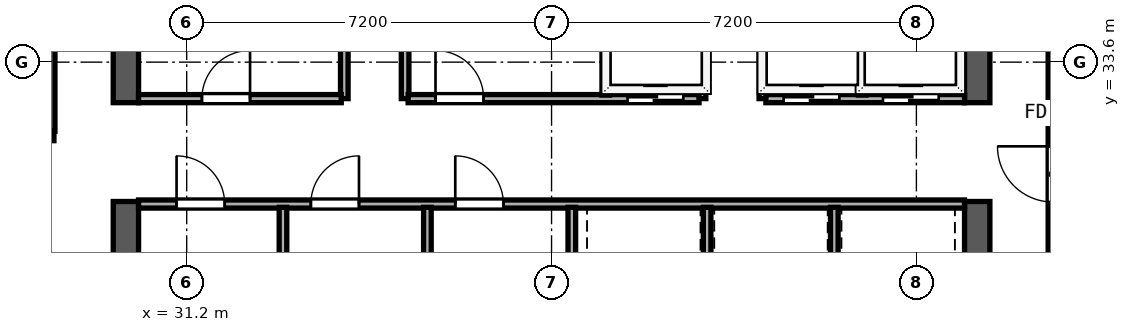
"""IFC4 building model, lengths in metres.
Left out: names, types, materials, properties, quantities, classifications, styles, units other than length and angle.
Written with IfcOpenShell. Run it as: python <this file> out.ifc"""

import sys

from ifc_helpers import new_model, si_unit, direction, frame, frame_2d, origin, place, context, subcontext, project, spatial, rectangle, extrude, element, fill, save


model = new_model("IFC4")
c1 = context("Model", 3, precision=1e-05, world=origin(), true_north=direction((0.0, 1.0)))
c2 = subcontext(c1, "Body", "Model", "MODEL_VIEW")
j1 = project(units=[si_unit("LENGTHUNIT", "METRE"), si_unit("PLANEANGLEUNIT", "RADIAN")], contexts=[c1])
p1 = place(None, origin())
s1 = spatial("IfcSite", under=j1, at=p1, CompositionType="ELEMENT")
p2 = place(p1, origin())
s2 = spatial("IfcBuilding", under=s1, at=p2, CompositionType="ELEMENT")
p3 = place(p2, frame((0.0, 0.0, 277.55)))
s3 = spatial("IfcBuildingStorey", under=s2, at=p3, CompositionType="ELEMENT", Elevation=277.55)
p4 = place(p3, frame((30.0, 26.65, 0.0), z_axis=(0.0, 0.0, 1.0), x_axis=(0.0, 1.0, 0.0)))
e1 = element("IfcWall", 1, at=p4, inside=s3, PredefinedType="SHEAR", context=c2, shape_type="SweptSolid", body=[
    extrude(rectangle(XDim=4.2, YDim=0.5, at=frame_2d((2.1, 0.0))), origin(), (0.0, 0.0, 1.0), 4.4),
])
p5 = place(p3, frame((30.0, 32.8, 0.0), z_axis=(0.0, 0.0, 1.0), x_axis=(0.0, 1.0, 0.0)))
e2 = element("IfcWall", 2, at=p5, inside=s3, PredefinedType="SHEAR", context=c2, shape_type="SweptSolid", body=[
    extrude(rectangle(XDim=10.15, YDim=0.5, at=frame_2d((5.075, 0.0))), origin(), (0.0, 0.0, 1.0), 4.4),
])
p6 = place(p3, frame((46.8, 26.65, 0.0), z_axis=(0.0, 0.0, 1.0), x_axis=(0.0, 1.0, 0.0)))
e3 = element("IfcWall", 3, at=p6, inside=s3, PredefinedType="SHEAR", context=c2, shape_type="SweptSolid", body=[
    extrude(rectangle(XDim=4.2, YDim=0.5, at=frame_2d((2.1, 0.0))), origin(), (0.0, 0.0, 1.0), 4.4),
])
p7 = place(p3, frame((46.8, 32.8, 0.0), z_axis=(0.0, 0.0, 1.0), x_axis=(0.0, 1.0, 0.0)))
e4 = element("IfcWall", 4, at=p7, inside=s3, PredefinedType="SHEAR", context=c2, shape_type="SweptSolid", body=[
    extrude(rectangle(XDim=10.15, YDim=0.5, at=frame_2d((5.075, 0.0))), origin(), (0.0, 0.0, 1.0), 4.4),
])
for number, where, z_axis, x_axis in (
    (5, (34.31, 32.88, 0.0), (0.0, 0.0, 1.0), (0.0, 1.0, 0.0)),
    (6, (35.51, 32.88, 0.0), (0.0, 0.0, 1.0), (0.0, 1.0, 0.0)),
    (7, (41.37, 32.88, 0.0), (0.0, 0.0, 1.0), (0.0, 1.0, 0.0)),
    (8, (42.57, 32.88, 0.0), (0.0, 0.0, 1.0), (0.0, 1.0, 0.0)),
):
    element("IfcWall", number, at=place(p3, frame(where, z_axis=z_axis, x_axis=x_axis)), inside=s3, PredefinedType="SOLIDWALL", context=c2, shape_type="SweptSolid", body=[
        extrude(rectangle(XDim=2.17, YDim=0.15, at=frame_2d((1.085, 0.0))), origin(), (0.0, 0.0, 1.0), 4.4),
    ])
p8 = place(p3, frame((30.25, 32.88, 0.0), z_axis=(0.0, 0.0, 1.0), x_axis=(1.0, 0.0, 0.0)))
e9 = element("IfcWall", 9, at=p8, inside=s3, PredefinedType="SOLIDWALL", context=c2, shape_type="SweptSolid", body=[
    extrude(rectangle(XDim=4.0, YDim=0.16, at=frame_2d((2.0, 0.0))), origin(), (0.0, 0.0, 1.0), 4.4),
])
p9 = place(p8, frame((2.2, 0.0, 0.0), z_axis=(0.0, 0.0, 1.0), x_axis=(-1.0, 0.0, 0.0)))
e10 = element("IfcOpeningElement", 10, at=p9, cuts=e9, PredefinedType="OPENING", context=c2, shape_type="SweptSolid", body=[
    extrude(rectangle(XDim=0.95, YDim=2.12, at=frame_2d((0.475, 1.06))), frame((0.0, 0.09, 0.0), z_axis=(0.0, -1.0, 0.0), x_axis=(1.0, 0.0, 0.0)), (0.0, 0.0, 1.0), 0.18),
])
p10 = place(p3, frame((35.57, 32.88, 0.0), z_axis=(0.0, 0.0, 1.0), x_axis=(1.0, 0.0, 0.0)))
e11 = element("IfcWall", 11, at=p10, inside=s3, PredefinedType="SOLIDWALL", context=c2, shape_type="SweptSolid", body=[
    extrude(rectangle(XDim=5.74, YDim=0.16, at=frame_2d((2.87, 0.0))), origin(), (0.0, 0.0, 1.0), 4.4),
])
p11 = place(p10, frame((1.49, 0.0, 0.0), z_axis=(0.0, 0.0, 1.0), x_axis=(-1.0, 0.0, 0.0)))
e12 = element("IfcOpeningElement", 12, at=p11, cuts=e11, PredefinedType="OPENING", context=c2, shape_type="SweptSolid", body=[
    extrude(rectangle(XDim=0.95, YDim=2.12, at=frame_2d((0.475, 1.06))), frame((0.0, 0.09, 0.0), z_axis=(0.0, -1.0, 0.0), x_axis=(1.0, 0.0, 0.0)), (0.0, 0.0, 1.0), 0.18),
])
p12 = place(p10, frame((5.43, 0.0, 0.0), z_axis=(0.0, 0.0, 1.0), x_axis=(-1.0, 0.0, 0.0)))
e13 = element("IfcOpeningElement", 13, at=p12, cuts=e11, PredefinedType="OPENING", context=c2, shape_type="SweptSolid", body=[
    extrude(rectangle(XDim=1.1, YDim=2.2, at=frame_2d((0.55, 1.1))), frame((0.0, 0.09, 0.0), z_axis=(0.0, -1.0, 0.0), x_axis=(1.0, 0.0, 0.0)), (0.0, 0.0, 1.0), 0.18),
])
p13 = place(p3, frame((42.63, 32.88, 0.0), z_axis=(0.0, 0.0, 1.0), x_axis=(1.0, 0.0, 0.0)))
e14 = element("IfcWall", 14, at=p13, inside=s3, PredefinedType="SOLIDWALL", context=c2, shape_type="SweptSolid", body=[
    extrude(rectangle(XDim=3.92, YDim=0.16, at=frame_2d((1.96, 0.0))), origin(), (0.0, 0.0, 1.0), 4.4),
])
p14 = place(p13, frame((1.45, 0.0, 0.0), z_axis=(0.0, 0.0, 1.0), x_axis=(-1.0, 0.0, 0.0)))
e15 = element("IfcOpeningElement", 15, at=p14, cuts=e14, PredefinedType="OPENING", context=c2, shape_type="SweptSolid", body=[
    extrude(rectangle(XDim=1.1, YDim=2.2, at=frame_2d((0.55, 1.1))), frame((0.0, 0.09, 0.0), z_axis=(0.0, -1.0, 0.0), x_axis=(1.0, 0.0, 0.0)), (0.0, 0.0, 1.0), 0.18),
])
p15 = place(p13, frame((3.41, 0.0, 0.0), z_axis=(0.0, 0.0, 1.0), x_axis=(-1.0, 0.0, 0.0)))
e16 = element("IfcOpeningElement", 16, at=p15, cuts=e14, PredefinedType="OPENING", context=c2, shape_type="SweptSolid", body=[
    extrude(rectangle(XDim=1.1, YDim=2.2, at=frame_2d((0.55, 1.1))), frame((0.0, 0.09, 0.0), z_axis=(0.0, -1.0, 0.0), x_axis=(1.0, 0.0, 0.0)), (0.0, 0.0, 1.0), 0.18),
])
for number, where, z_axis, x_axis in (
    (17, (39.47, 32.95, 0.0), (0.0, 0.0, 1.0), (0.0, 1.0, 0.0)),
    (18, (44.53, 32.95, 0.0), (0.0, 0.0, 1.0), (0.0, 1.0, 0.0)),
):
    element("IfcWall", number, at=place(p3, frame(where, z_axis=z_axis, x_axis=x_axis)), inside=s3, PredefinedType="SOLIDWALL", context=c2, shape_type="SweptSolid", body=[
        extrude(rectangle(XDim=2.05, YDim=0.15, at=frame_2d((1.025, 0.0))), origin(), (0.0, 0.0, 1.0), 4.4),
    ])
p16 = place(p3, frame((30.25, 30.8, 0.0), z_axis=(0.0, 0.0, 1.0), x_axis=(1.0, 0.0, 0.0)))
e19 = element("IfcWall", 19, at=p16, inside=s3, PredefinedType="SOLIDWALL", context=c2, shape_type="SweptSolid", body=[
    extrude(rectangle(XDim=16.3, YDim=0.16, at=frame_2d((8.15, 0.0))), origin(), (0.0, 0.0, 1.0), 4.4),
])
p17 = place(p16, frame((0.75, 0.0, 0.0)))
e20 = element("IfcOpeningElement", 20, at=p17, cuts=e19, PredefinedType="OPENING", context=c2, shape_type="SweptSolid", body=[
    extrude(rectangle(XDim=0.95, YDim=2.12, at=frame_2d((0.475, 1.06))), frame((0.0, 0.09, 0.0), z_axis=(0.0, -1.0, 0.0), x_axis=(1.0, 0.0, 0.0)), (0.0, 0.0, 1.0), 0.18),
])
p18 = place(p16, frame((3.4, 0.0, 0.0)))
e21 = element("IfcOpeningElement", 21, at=p18, cuts=e19, PredefinedType="OPENING", context=c2, shape_type="SweptSolid", body=[
    extrude(rectangle(XDim=0.95, YDim=2.12, at=frame_2d((0.475, 1.06))), frame((0.0, 0.09, 0.0), z_axis=(0.0, -1.0, 0.0), x_axis=(1.0, 0.0, 0.0)), (0.0, 0.0, 1.0), 0.18),
])
p19 = place(p16, frame((6.25, 0.0, 0.0)))
e22 = element("IfcOpeningElement", 22, at=p19, cuts=e19, PredefinedType="OPENING", context=c2, shape_type="SweptSolid", body=[
    extrude(rectangle(XDim=0.95, YDim=2.12, at=frame_2d((0.475, 1.06))), frame((0.0, 0.09, 0.0), z_axis=(0.0, -1.0, 0.0), x_axis=(1.0, 0.0, 0.0)), (0.0, 0.0, 1.0), 0.18),
])
p20 = place(p3, frame((38.8, 26.66, 0.0), z_axis=(0.0, 0.0, 1.0), x_axis=(0.0, 1.0, 0.0)))
e23 = element("IfcWall", 23, at=p20, inside=s3, PredefinedType="SOLIDWALL", context=c2, shape_type="SweptSolid", body=[
    extrude(rectangle(XDim=4.075, YDim=0.15, at=frame_2d((2.038, 0.0))), origin(), (0.0, 0.0, 1.0), 4.4),
])
for number, where, z_axis, x_axis in (
    (24, (33.1, 26.66, 0.0), (0.0, 0.0, 1.0), (0.0, 1.0, 0.0)),
    (25, (35.95, 26.66, 0.0), (0.0, 0.0, 1.0), (0.0, 1.0, 0.0)),
):
    element("IfcWall", number, at=place(p3, frame(where, z_axis=z_axis, x_axis=x_axis)), inside=s3, PredefinedType="PARTITIONING", context=c2, shape_type="SweptSolid", body=[
        extrude(rectangle(XDim=4.075, YDim=0.15, at=frame_2d((2.038, 0.0))), origin(), (0.0, 0.0, 1.0), 4.4),
    ])
for number, where, z_axis, x_axis in (
    (26, (41.47, 28.75, 0.0), (0.0, 0.0, 1.0), (0.0, 1.0, 0.0)),
    (27, (43.98, 28.75, 0.0), (0.0, 0.0, 1.0), (0.0, 1.0, 0.0)),
):
    element("IfcWall", number, at=place(p3, frame(where, z_axis=z_axis, x_axis=x_axis)), inside=s3, PredefinedType="SOLIDWALL", context=c2, shape_type="SweptSolid", body=[
        extrude(rectangle(XDim=1.985, YDim=0.15, at=frame_2d((0.993, 0.0))), origin(), (0.0, 0.0, 1.0), 4.4),
    ])
p21 = place(p3, frame((24.5, 32.15, 0.0), z_axis=(0.0, 0.0, 1.0), x_axis=(1.0, 0.0, 0.0)))
e28 = element("IfcWall", 28, at=p21, inside=s3, PredefinedType="SOLIDWALL", context=c2, shape_type="SweptSolid", body=[
    extrude(rectangle(XDim=4.08, YDim=0.2, at=frame_2d((2.04, 0.0))), origin(), (0.0, 0.0, 1.0), 4.4),
])
p22 = place(p3, frame((28.5, 32.235, 0.0), z_axis=(0.0, 0.0, 1.0), x_axis=(0.0, 1.0, 0.0)))
e29 = element("IfcWall", 29, at=p22, inside=s3, PredefinedType="SOLIDWALL", context=c2, shape_type="SweptSolid", body=[
    extrude(rectangle(XDim=6.48, YDim=0.2, at=frame_2d((3.24, 0.0))), origin(), (0.0, 0.0, 1.0), 4.4),
])
p23 = place(p22, frame((3.135, 0.0, 0.0), z_axis=(0.0, 0.0, 1.0), x_axis=(-1.0, 0.0, 0.0)))
e30 = element("IfcOpeningElement", 30, at=p23, cuts=e29, PredefinedType="OPENING", context=c2, shape_type="SweptSolid", body=[
    extrude(rectangle(XDim=1.1, YDim=2.15, at=frame_2d((0.55, 1.075))), frame((0.0, 0.11, 0.0), z_axis=(0.0, -1.0, 0.0), x_axis=(1.0, 0.0, 0.0)), (0.0, 0.0, 1.0), 0.22),
])
p24 = place(p3, frame((48.3, 25.135, 0.0), z_axis=(0.0, 0.0, 1.0), x_axis=(0.0, 1.0, 0.0)))
e31 = element("IfcWall", 31, at=p24, inside=s3, PredefinedType="SOLIDWALL", context=c2, shape_type="SweptSolid", body=[
    extrude(rectangle(XDim=13.58, YDim=0.2, at=frame_2d((6.79, 0.0))), origin(), (0.0, 0.0, 1.0), 4.4),
])
p25 = place(p24, frame((5.704, 0.0, 0.0)))
e32 = element("IfcOpeningElement", 32, at=p25, cuts=e31, PredefinedType="OPENING", context=c2, shape_type="SweptSolid", body=[
    extrude(rectangle(XDim=1.1, YDim=2.15, at=frame_2d((0.55, 1.075))), frame((0.0, 0.11, 0.0), z_axis=(0.0, -1.0, 0.0), x_axis=(1.0, 0.0, 0.0)), (0.0, 0.0, 1.0), 0.22),
])
p26 = place(p9, origin())
e33 = element("IfcDoor", 33, at=p26, inside=s3, OperationType="SINGLE_SWING_LEFT", PredefinedType="DOOR", context=c2, shape_type="SweptSolid", body=[
    extrude(rectangle(XDim=0.95, YDim=2.12, at=frame_2d((0.475, 1.06))), frame((0.0, 0.025, 0.0), z_axis=(0.0, -1.0, 0.0), x_axis=(1.0, 0.0, 0.0)), (0.0, 0.0, 1.0), 0.05),
])
fill(e10, e33)
p27 = place(p11, origin())
e34 = element("IfcDoor", 34, at=p27, inside=s3, OperationType="SINGLE_SWING_RIGHT", PredefinedType="DOOR", context=c2, shape_type="SweptSolid", body=[
    extrude(rectangle(XDim=0.95, YDim=2.12, at=frame_2d((0.475, 1.06))), frame((0.0, 0.025, 0.0), z_axis=(0.0, -1.0, 0.0), x_axis=(1.0, 0.0, 0.0)), (0.0, 0.0, 1.0), 0.05),
])
fill(e12, e34)
p28 = place(p12, origin())
e35 = element("IfcDoor", 35, at=p28, inside=s3, OperationType="SLIDING_TO_RIGHT", PredefinedType="DOOR", context=c2, shape_type="SweptSolid", body=[
    extrude(rectangle(XDim=1.1, YDim=2.2, at=frame_2d((0.55, 1.1))), frame((0.0, 0.025, 0.0), z_axis=(0.0, -1.0, 0.0), x_axis=(1.0, 0.0, 0.0)), (0.0, 0.0, 1.0), 0.05),
])
fill(e13, e35)
p29 = place(p14, origin())
e36 = element("IfcDoor", 36, at=p29, inside=s3, OperationType="SLIDING_TO_RIGHT", PredefinedType="DOOR", context=c2, shape_type="SweptSolid", body=[
    extrude(rectangle(XDim=1.1, YDim=2.2, at=frame_2d((0.55, 1.1))), frame((0.0, 0.025, 0.0), z_axis=(0.0, -1.0, 0.0), x_axis=(1.0, 0.0, 0.0)), (0.0, 0.0, 1.0), 0.05),
])
fill(e15, e36)
p30 = place(p15, origin())
e37 = element("IfcDoor", 37, at=p30, inside=s3, OperationType="SLIDING_TO_RIGHT", PredefinedType="DOOR", context=c2, shape_type="SweptSolid", body=[
    extrude(rectangle(XDim=1.1, YDim=2.2, at=frame_2d((0.55, 1.1))), frame((0.0, 0.025, 0.0), z_axis=(0.0, -1.0, 0.0), x_axis=(1.0, 0.0, 0.0)), (0.0, 0.0, 1.0), 0.05),
])
fill(e16, e37)
p31 = place(p17, origin())
e38 = element("IfcDoor", 38, at=p31, inside=s3, OperationType="SINGLE_SWING_LEFT", PredefinedType="DOOR", context=c2, shape_type="SweptSolid", body=[
    extrude(rectangle(XDim=0.95, YDim=2.12, at=frame_2d((0.475, 1.06))), frame((0.0, 0.025, 0.0), z_axis=(0.0, -1.0, 0.0), x_axis=(1.0, 0.0, 0.0)), (0.0, 0.0, 1.0), 0.05),
])
fill(e20, e38)
p32 = place(p18, origin())
e39 = element("IfcDoor", 39, at=p32, inside=s3, OperationType="SINGLE_SWING_RIGHT", PredefinedType="DOOR", context=c2, shape_type="SweptSolid", body=[
    extrude(rectangle(XDim=0.95, YDim=2.12, at=frame_2d((0.475, 1.06))), frame((0.0, 0.025, 0.0), z_axis=(0.0, -1.0, 0.0), x_axis=(1.0, 0.0, 0.0)), (0.0, 0.0, 1.0), 0.05),
])
fill(e21, e39)
p33 = place(p19, origin())
e40 = element("IfcDoor", 40, at=p33, inside=s3, OperationType="SINGLE_SWING_LEFT", PredefinedType="DOOR", context=c2, shape_type="SweptSolid", body=[
    extrude(rectangle(XDim=0.95, YDim=2.12, at=frame_2d((0.475, 1.06))), frame((0.0, 0.025, 0.0), z_axis=(0.0, -1.0, 0.0), x_axis=(1.0, 0.0, 0.0)), (0.0, 0.0, 1.0), 0.05),
])
fill(e22, e40)
save(model, sys.argv[1])
